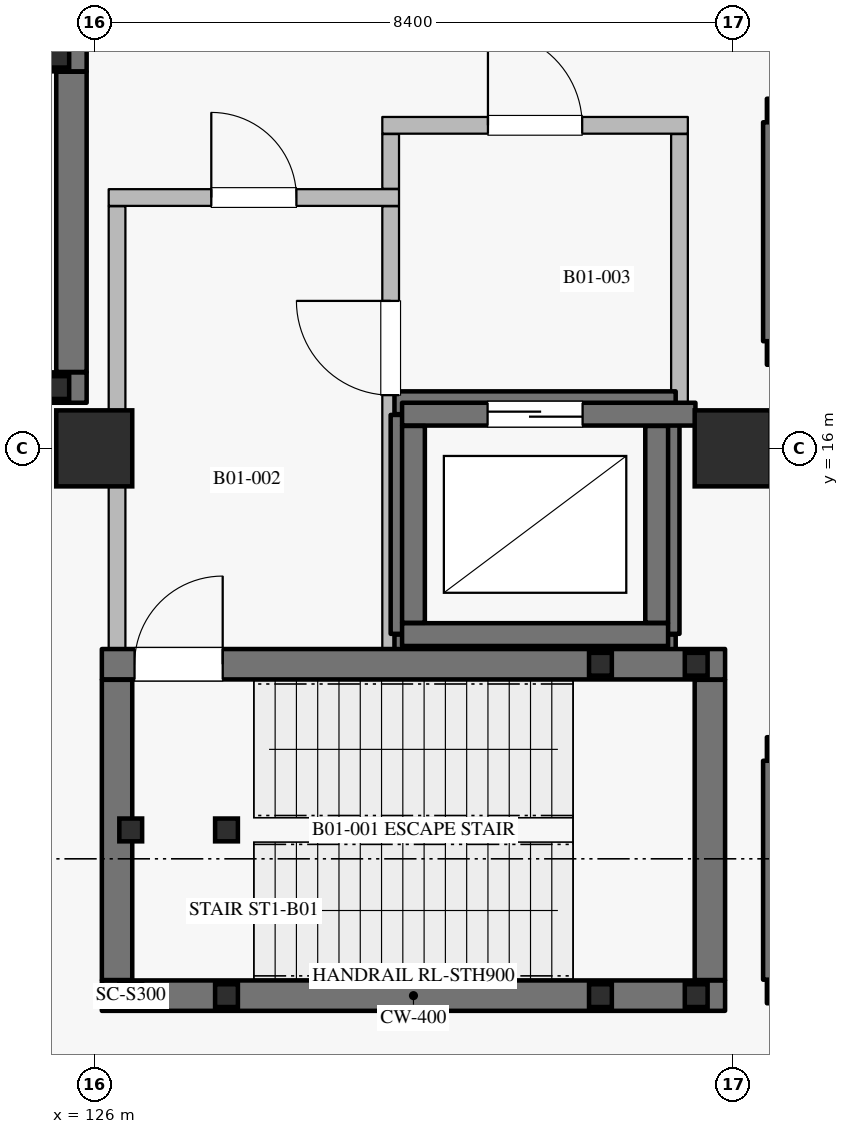
"""IFC4 building model, lengths in metres.
Left out: names, types, materials, properties, quantities, classifications, styles, units other than length and angle.
Written with IfcOpenShell. Run it as: python <this file> out.ifc"""

import sys

from ifc_helpers import new_model, si_unit, direction, frame, frame_2d, origin, origin_2d, place, context, subcontext, project, spatial, rectangle, hollow_rectangle, extrude, element, fill, save


model = new_model("IFC4")
c1 = context("Model", 3, precision=1e-05, world=origin(), true_north=direction((0.0, 1.0)))
c2 = subcontext(c1, "Body", "Model", "MODEL_VIEW")
j1 = project(units=[si_unit("LENGTHUNIT", "METRE"), si_unit("PLANEANGLEUNIT", "RADIAN")], contexts=[c1])
p1 = place(None, origin())
s1 = spatial("IfcSite", under=j1, at=p1, CompositionType="ELEMENT")
p2 = place(p1, origin())
s2 = spatial("IfcBuilding", under=s1, at=p2, CompositionType="ELEMENT")
p3 = place(p2, frame((0.0, 0.0, -5.4)))
s3 = spatial("IfcBuildingStorey", under=s2, at=p3, CompositionType="ELEMENT", Elevation=-5.4)
for number, where, z_axis, x_axis in (
    (1, (126.0, 16.0, 0.0), (0.0, 0.0, 1.0), (1.0, 0.0, 0.0)),
    (2, (134.4, 16.0, 0.0), (0.0, 0.0, 1.0), (1.0, 0.0, 0.0)),
):
    element("IfcColumn", number, at=place(p3, frame(where, z_axis=z_axis, x_axis=x_axis)), inside=s3, PredefinedType="COLUMN", context=c2, shape_type="SweptSolid", body=[
        extrude(rectangle(XDim=1.0, YDim=1.0, at=origin_2d()), origin(), (0.0, 0.0, 1.0), 5.4),
    ])
for number, where, z_axis, x_axis in (
    (3, (134.85, 17.25, -1.4), (0.0, 0.0, 1.0), (1.0, 0.0, 0.0)),
    (4, (138.45, 20.45, -1.4), (0.0, 0.0, 1.0), (-1.0, 0.0, 0.0)),
):
    element("IfcWall", number, at=place(p3, frame(where, z_axis=z_axis, x_axis=x_axis)), inside=s3, PredefinedType="USERDEFINED", context=c2, shape_type="SweptSolid", body=[
        extrude(rectangle(XDim=3.6, YDim=0.3, at=frame_2d((1.8, 0.0))), origin(), (0.0, 0.0, 1.0), 1.4),
    ])
p4 = place(p3, frame((134.95, 20.29, -1.4), z_axis=(0.0, 0.0, 1.0), x_axis=(0.0, -1.0, 0.0)))
e5 = element("IfcWall", 5, at=p4, inside=s3, PredefinedType="USERDEFINED", context=c2, shape_type="SweptSolid", body=[
    extrude(rectangle(XDim=2.88, YDim=0.3, at=frame_2d((1.44, 0.0))), origin(), (0.0, 0.0, 1.0), 1.4),
])
for number, where, z_axis, x_axis in (
    (6, (134.85, 8.85, -1.4), (0.0, 0.0, 1.0), (1.0, 0.0, 0.0)),
    (7, (138.45, 12.05, -1.4), (0.0, 0.0, 1.0), (-1.0, 0.0, 0.0)),
):
    element("IfcWall", number, at=place(p3, frame(where, z_axis=z_axis, x_axis=x_axis)), inside=s3, PredefinedType="USERDEFINED", context=c2, shape_type="SweptSolid", body=[
        extrude(rectangle(XDim=3.6, YDim=0.3, at=frame_2d((1.8, 0.0))), origin(), (0.0, 0.0, 1.0), 1.4),
    ])
p5 = place(p3, frame((134.95, 11.89, -1.4), z_axis=(0.0, 0.0, 1.0), x_axis=(0.0, -1.0, 0.0)))
e8 = element("IfcWall", 8, at=p5, inside=s3, PredefinedType="USERDEFINED", context=c2, shape_type="SweptSolid", body=[
    extrude(rectangle(XDim=2.88, YDim=0.3, at=frame_2d((1.44, 0.0))), origin(), (0.0, 0.0, 1.0), 1.4),
])
p6 = place(p3, frame((129.95, 13.4, -1.4), z_axis=(0.0, 0.0, 1.0), x_axis=(1.0, 0.0, 0.0)))
e9 = element("IfcWall", 9, at=p6, inside=s3, PredefinedType="USERDEFINED", context=c2, shape_type="SweptSolid", body=[
    extrude(rectangle(XDim=3.7, YDim=0.3, at=frame_2d((1.85, 0.0))), origin(), (0.0, 0.0, 1.0), 1.4),
])
p7 = place(p3, frame((133.55, 13.56, -1.4), z_axis=(0.0, 0.0, 1.0), x_axis=(0.0, 1.0, 0.0)))
e10 = element("IfcWall", 10, at=p7, inside=s3, PredefinedType="USERDEFINED", context=c2, shape_type="SweptSolid", body=[
    extrude(rectangle(XDim=2.88, YDim=0.3, at=frame_2d((1.44, 0.0))), origin(), (0.0, 0.0, 1.0), 1.4),
])
p8 = place(p3, frame((133.65, 16.6, -1.4), z_axis=(0.0, 0.0, 1.0), x_axis=(-1.0, 0.0, 0.0)))
e11 = element("IfcWall", 11, at=p8, inside=s3, PredefinedType="USERDEFINED", context=c2, shape_type="SweptSolid", body=[
    extrude(rectangle(XDim=3.7, YDim=0.3, at=frame_2d((1.85, 0.0))), origin(), (0.0, 0.0, 1.0), 1.4),
])
p9 = place(p3, frame((130.05, 16.44, -1.4), z_axis=(0.0, 0.0, 1.0), x_axis=(0.0, -1.0, 0.0)))
e12 = element("IfcWall", 12, at=p9, inside=s3, PredefinedType="USERDEFINED", context=c2, shape_type="SweptSolid", body=[
    extrude(rectangle(XDim=2.88, YDim=0.3, at=frame_2d((1.44, 0.0))), origin(), (0.0, 0.0, 1.0), 1.4),
])
p10 = place(p3, frame((130.05, 13.55, 0.0), z_axis=(0.0, 0.0, 1.0), x_axis=(1.0, 0.0, 0.0)))
e13 = element("IfcWall", 13, at=p10, inside=s3, PredefinedType="SHEAR", context=c2, shape_type="SweptSolid", body=[
    extrude(rectangle(XDim=3.5, YDim=0.3, at=frame_2d((1.75, 0.0))), origin(), (0.0, 0.0, 1.0), 4.995),
])
p11 = place(p3, frame((133.4, 13.705, 0.0), z_axis=(0.0, 0.0, 1.0), x_axis=(0.0, 1.0, 0.0)))
e14 = element("IfcWall", 14, at=p11, inside=s3, PredefinedType="SHEAR", context=c2, shape_type="SweptSolid", body=[
    extrude(rectangle(XDim=2.59, YDim=0.3, at=frame_2d((1.295, 0.0))), origin(), (0.0, 0.0, 1.0), 4.995),
])
p12 = place(p3, frame((133.91, 16.45, 0.0), z_axis=(0.0, 0.0, 1.0), x_axis=(-1.0, 0.0, 0.0)))
e15 = element("IfcWall", 15, at=p12, inside=s3, PredefinedType="SHEAR", context=c2, shape_type="SweptSolid", body=[
    extrude(rectangle(XDim=3.86, YDim=0.3, at=frame_2d((1.93, 0.0))), origin(), (0.0, 0.0, 1.0), 4.995),
])
p13 = place(p12, frame((1.485, 0.0, 0.0)))
e16 = element("IfcOpeningElement", 16, at=p13, cuts=e15, PredefinedType="OPENING", context=c2, shape_type="SweptSolid", body=[
    extrude(rectangle(XDim=1.25, YDim=2.25, at=frame_2d((0.625, 1.125))), frame((0.0, 0.16, 0.0), z_axis=(0.0, -1.0, 0.0), x_axis=(1.0, 0.0, 0.0)), (0.0, 0.0, 1.0), 0.32),
])
p14 = place(p3, frame((130.2, 16.295, 0.0), z_axis=(0.0, 0.0, 1.0), x_axis=(0.0, -1.0, 0.0)))
e17 = element("IfcWall", 17, at=p14, inside=s3, PredefinedType="SHEAR", context=c2, shape_type="SweptSolid", body=[
    extrude(rectangle(XDim=2.59, YDim=0.3, at=frame_2d((1.295, 0.0))), origin(), (0.0, 0.0, 1.0), 4.995),
])
p15 = place(p3, frame((126.1, 8.8, 0.0), z_axis=(0.0, 0.0, 1.0), x_axis=(1.0, 0.0, 0.0)))
e18 = element("IfcWall", 18, at=p15, inside=s3, PredefinedType="SHEAR", context=c2, shape_type="SweptSolid", body=[
    extrude(rectangle(XDim=8.2, YDim=0.4, at=frame_2d((4.1, 0.0))), origin(), (0.0, 0.0, 1.0), 4.995),
])
p16 = place(p3, frame((134.1, 9.005, 0.0), z_axis=(0.0, 0.0, 1.0), x_axis=(0.0, 1.0, 0.0)))
e19 = element("IfcWall", 19, at=p16, inside=s3, PredefinedType="SHEAR", context=c2, shape_type="SweptSolid", body=[
    extrude(rectangle(XDim=3.95, YDim=0.4, at=frame_2d((1.975, 0.0))), origin(), (0.0, 0.0, 1.0), 4.995),
])
p17 = place(p3, frame((126.1, 13.16, 0.0), z_axis=(0.0, 0.0, 1.0), x_axis=(1.0, 0.0, 0.0)))
e20 = element("IfcWall", 20, at=p17, inside=s3, PredefinedType="SHEAR", context=c2, shape_type="SweptSolid", body=[
    extrude(rectangle(XDim=8.2, YDim=0.4, at=frame_2d((4.1, 0.0))), origin(), (0.0, 0.0, 1.0), 4.995),
])
p18 = place(p17, frame((0.43, 0.0, 0.0)))
e21 = element("IfcOpeningElement", 21, at=p18, cuts=e20, PredefinedType="OPENING", context=c2, shape_type="SweptSolid", body=[
    extrude(rectangle(XDim=1.16, YDim=2.2, at=frame_2d((0.58, 1.1))), frame((0.0, 0.21, 0.0), z_axis=(0.0, -1.0, 0.0), x_axis=(1.0, 0.0, 0.0)), (0.0, 0.0, 1.0), 0.42),
])
p19 = place(p3, frame((126.3, 9.005, 0.0), z_axis=(0.0, 0.0, 1.0), x_axis=(0.0, 1.0, 0.0)))
e22 = element("IfcWall", 22, at=p19, inside=s3, PredefinedType="SHEAR", context=c2, shape_type="SweptSolid", body=[
    extrude(rectangle(XDim=3.95, YDim=0.4, at=frame_2d((1.975, 0.0))), origin(), (0.0, 0.0, 1.0), 4.995),
])
p20 = place(p3, frame((126.3, 13.365, 0.0), z_axis=(0.0, 0.0, 1.0), x_axis=(0.0, 1.0, 0.0)))
e23 = element("IfcWall", 23, at=p20, inside=s3, PredefinedType="PARTITIONING", context=c2, shape_type="SweptSolid", body=[
    extrude(rectangle(XDim=5.82, YDim=0.22, at=frame_2d((2.91, 0.0))), origin(), (0.0, 0.0, 1.0), 4.05),
])
p21 = place(p3, frame((126.19, 19.3, 0.0), z_axis=(0.0, 0.0, 1.0), x_axis=(1.0, 0.0, 0.0)))
e24 = element("IfcWall", 24, at=p21, inside=s3, PredefinedType="PARTITIONING", context=c2, shape_type="SweptSolid", body=[
    extrude(rectangle(XDim=3.82, YDim=0.22, at=frame_2d((1.91, 0.0))), origin(), (0.0, 0.0, 1.0), 4.995),
])
p22 = place(p21, frame((1.35, 0.0, 0.0)))
e25 = element("IfcOpeningElement", 25, at=p22, cuts=e24, PredefinedType="OPENING", context=c2, shape_type="SweptSolid", body=[
    extrude(rectangle(XDim=1.12, YDim=2.2, at=frame_2d((0.56, 1.1))), frame((0.0, 0.12, 0.0), z_axis=(0.0, -1.0, 0.0), x_axis=(1.0, 0.0, 0.0)), (0.0, 0.0, 1.0), 0.24),
])
p23 = place(p3, frame((129.9, 13.365, 0.0), z_axis=(0.0, 0.0, 1.0), x_axis=(0.0, 1.0, 0.0)))
e26 = element("IfcWall", 26, at=p23, inside=s3, PredefinedType="PARTITIONING", context=c2, shape_type="SweptSolid", body=[
    extrude(rectangle(XDim=5.82, YDim=0.22, at=frame_2d((2.91, 0.0))), origin(), (0.0, 0.0, 1.0), 4.995),
])
p24 = place(p23, frame((3.335, 0.0, 0.0)))
e27 = element("IfcOpeningElement", 27, at=p24, cuts=e26, PredefinedType="OPENING", context=c2, shape_type="SweptSolid", body=[
    extrude(rectangle(XDim=1.24, YDim=2.2, at=frame_2d((0.62, 1.1))), frame((0.0, 0.12, 0.0), z_axis=(0.0, -1.0, 0.0), x_axis=(1.0, 0.0, 0.0)), (0.0, 0.0, 1.0), 0.24),
])
p25 = place(p3, frame((129.9, 19.415, 0.0), z_axis=(0.0, 0.0, 1.0), x_axis=(0.0, 1.0, 0.0)))
e28 = element("IfcWall", 28, at=p25, inside=s3, PredefinedType="PARTITIONING", context=c2, shape_type="SweptSolid", body=[
    extrude(rectangle(XDim=0.72, YDim=0.22, at=frame_2d((0.36, 0.0))), origin(), (0.0, 0.0, 1.0), 4.995),
])
p26 = place(p3, frame((133.7, 16.605, 0.0), z_axis=(0.0, 0.0, 1.0), x_axis=(0.0, 1.0, 0.0)))
e29 = element("IfcWall", 29, at=p26, inside=s3, PredefinedType="PARTITIONING", context=c2, shape_type="SweptSolid", body=[
    extrude(rectangle(XDim=3.53, YDim=0.22, at=frame_2d((1.765, 0.0))), origin(), (0.0, 0.0, 1.0), 4.995),
])
p27 = place(p3, frame((129.79, 20.25, 0.0), z_axis=(0.0, 0.0, 1.0), x_axis=(1.0, 0.0, 0.0)))
e30 = element("IfcWall", 30, at=p27, inside=s3, PredefinedType="PARTITIONING", context=c2, shape_type="SweptSolid", body=[
    extrude(rectangle(XDim=4.02, YDim=0.22, at=frame_2d((2.01, 0.0))), origin(), (0.0, 0.0, 1.0), 4.995),
])
p28 = place(p27, frame((1.39, 0.0, 0.0)))
e31 = element("IfcOpeningElement", 31, at=p28, cuts=e30, PredefinedType="OPENING", context=c2, shape_type="SweptSolid", body=[
    extrude(rectangle(XDim=1.24, YDim=2.2, at=frame_2d((0.62, 1.1))), frame((0.0, 0.12, 0.0), z_axis=(0.0, -1.0, 0.0), x_axis=(1.0, 0.0, 0.0)), (0.0, 0.0, 1.0), 0.24),
])
for number, where, z_axis, x_axis in (
    (32, (126.48, 8.8, 0.0), (0.0, 0.0, 1.0), (1.0, 0.0, 0.0)),
    (33, (126.48, 10.98, 0.0), (0.0, 0.0, 1.0), (1.0, 0.0, 0.0)),
    (34, (127.74, 8.8, 0.0), (0.0, 0.0, 1.0), (1.0, 0.0, 0.0)),
    (35, (127.74, 10.98, 0.0), (0.0, 0.0, 1.0), (1.0, 0.0, 0.0)),
):
    element("IfcColumn", number, at=place(p3, frame(where, z_axis=z_axis, x_axis=x_axis)), inside=s3, PredefinedType="COLUMN", context=c2, shape_type="SweptSolid", body=[
        extrude(hollow_rectangle(XDim=0.3, YDim=0.3, WallThickness=0.012, at=origin_2d()), origin(), (0.0, 0.0, 1.0), 5.22),
    ])
for number, where, z_axis, x_axis in (
    (36, (132.66, 8.8, 0.0), (0.0, 0.0, 1.0), (1.0, 0.0, 0.0)),
    (37, (132.66, 13.16, 0.0), (0.0, 0.0, 1.0), (1.0, 0.0, 0.0)),
    (38, (133.92, 8.8, 0.0), (0.0, 0.0, 1.0), (1.0, 0.0, 0.0)),
    (39, (133.92, 13.16, 0.0), (0.0, 0.0, 1.0), (1.0, 0.0, 0.0)),
):
    element("IfcColumn", number, at=place(p3, frame(where, z_axis=z_axis, x_axis=x_axis)), inside=s3, PredefinedType="COLUMN", context=c2, shape_type="SweptSolid", body=[
        extrude(hollow_rectangle(XDim=0.3, YDim=0.3, WallThickness=0.012, at=origin_2d()), origin(), (0.0, 0.0, 1.0), 2.52),
    ])
p29 = place(p3, frame((117.7, 16.8, 0.0), z_axis=(0.0, 0.0, 1.0), x_axis=(1.0, 0.0, 0.0)))
e40 = element("IfcWall", 40, at=p29, inside=s3, PredefinedType="SHEAR", context=c2, shape_type="SweptSolid", body=[
    extrude(rectangle(XDim=8.2, YDim=0.4, at=frame_2d((4.1, 0.0))), origin(), (0.0, 0.0, 1.0), 4.995),
])
p30 = place(p3, frame((125.7, 17.005, 0.0), z_axis=(0.0, 0.0, 1.0), x_axis=(0.0, 1.0, 0.0)))
e41 = element("IfcWall", 41, at=p30, inside=s3, PredefinedType="SHEAR", context=c2, shape_type="SweptSolid", body=[
    extrude(rectangle(XDim=3.95, YDim=0.4, at=frame_2d((1.975, 0.0))), origin(), (0.0, 0.0, 1.0), 4.995),
])
p31 = place(p3, frame((117.7, 21.16, 0.0), z_axis=(0.0, 0.0, 1.0), x_axis=(1.0, 0.0, 0.0)))
e42 = element("IfcWall", 42, at=p31, inside=s3, PredefinedType="SHEAR", context=c2, shape_type="SweptSolid", body=[
    extrude(rectangle(XDim=8.2, YDim=0.4, at=frame_2d((4.1, 0.0))), origin(), (0.0, 0.0, 1.0), 4.995),
])
p32 = place(p31, frame((0.43, 0.0, 0.0)))
e43 = element("IfcOpeningElement", 43, at=p32, cuts=e42, PredefinedType="OPENING", context=c2, shape_type="SweptSolid", body=[
    extrude(rectangle(XDim=1.16, YDim=2.2, at=frame_2d((0.58, 1.1))), frame((0.0, 0.21, 0.0), z_axis=(0.0, -1.0, 0.0), x_axis=(1.0, 0.0, 0.0)), (0.0, 0.0, 1.0), 0.42),
])
for number, where, z_axis, x_axis in (
    (44, (125.52, 16.8, 0.0), (0.0, 0.0, 1.0), (1.0, 0.0, 0.0)),
    (45, (125.52, 21.16, 0.0), (0.0, 0.0, 1.0), (1.0, 0.0, 0.0)),
):
    element("IfcColumn", number, at=place(p3, frame(where, z_axis=z_axis, x_axis=x_axis)), inside=s3, PredefinedType="COLUMN", context=c2, shape_type="SweptSolid", body=[
        extrude(hollow_rectangle(XDim=0.3, YDim=0.3, WallThickness=0.012, at=origin_2d()), origin(), (0.0, 0.0, 1.0), 2.52),
    ])
p33 = place(p13, origin())
e46 = element("IfcDoor", 46, at=p33, inside=s3, OperationType="DOUBLE_DOOR_SLIDING", PredefinedType="DOOR", context=c2, shape_type="SweptSolid", body=[
    extrude(rectangle(XDim=1.25, YDim=2.25, at=frame_2d((0.625, 1.125))), frame((0.0, 0.025, 0.0), z_axis=(0.0, -1.0, 0.0), x_axis=(1.0, 0.0, 0.0)), (0.0, 0.0, 1.0), 0.05),
])
fill(e16, e46)
p34 = place(p18, origin())
e47 = element("IfcDoor", 47, at=p34, inside=s3, OperationType="SINGLE_SWING_RIGHT", PredefinedType="DOOR", context=c2, shape_type="SweptSolid", body=[
    extrude(rectangle(XDim=1.16, YDim=2.2, at=frame_2d((0.58, 1.1))), frame((0.0, 0.025, 0.0), z_axis=(0.0, -1.0, 0.0), x_axis=(1.0, 0.0, 0.0)), (0.0, 0.0, 1.0), 0.05),
])
fill(e21, e47)
p35 = place(p22, origin())
e48 = element("IfcDoor", 48, at=p35, inside=s3, OperationType="SINGLE_SWING_LEFT", PredefinedType="DOOR", context=c2, shape_type="SweptSolid", body=[
    extrude(rectangle(XDim=1.12, YDim=2.2, at=frame_2d((0.56, 1.1))), frame((0.0, 0.025, 0.0), z_axis=(0.0, -1.0, 0.0), x_axis=(1.0, 0.0, 0.0)), (0.0, 0.0, 1.0), 0.05),
])
fill(e25, e48)
p36 = place(p24, origin())
e49 = element("IfcDoor", 49, at=p36, inside=s3, OperationType="SINGLE_SWING_RIGHT", PredefinedType="DOOR", context=c2, shape_type="SweptSolid", body=[
    extrude(rectangle(XDim=1.24, YDim=2.2, at=frame_2d((0.62, 1.1))), frame((0.0, 0.025, 0.0), z_axis=(0.0, -1.0, 0.0), x_axis=(1.0, 0.0, 0.0)), (0.0, 0.0, 1.0), 0.05),
])
fill(e27, e49)
p37 = place(p28, origin())
e50 = element("IfcDoor", 50, at=p37, inside=s3, OperationType="SINGLE_SWING_LEFT", PredefinedType="DOOR", context=c2, shape_type="SweptSolid", body=[
    extrude(rectangle(XDim=1.24, YDim=2.2, at=frame_2d((0.62, 1.1))), frame((0.0, 0.025, 0.0), z_axis=(0.0, -1.0, 0.0), x_axis=(1.0, 0.0, 0.0)), (0.0, 0.0, 1.0), 0.05),
])
fill(e31, e50)
save(model, sys.argv[1])
